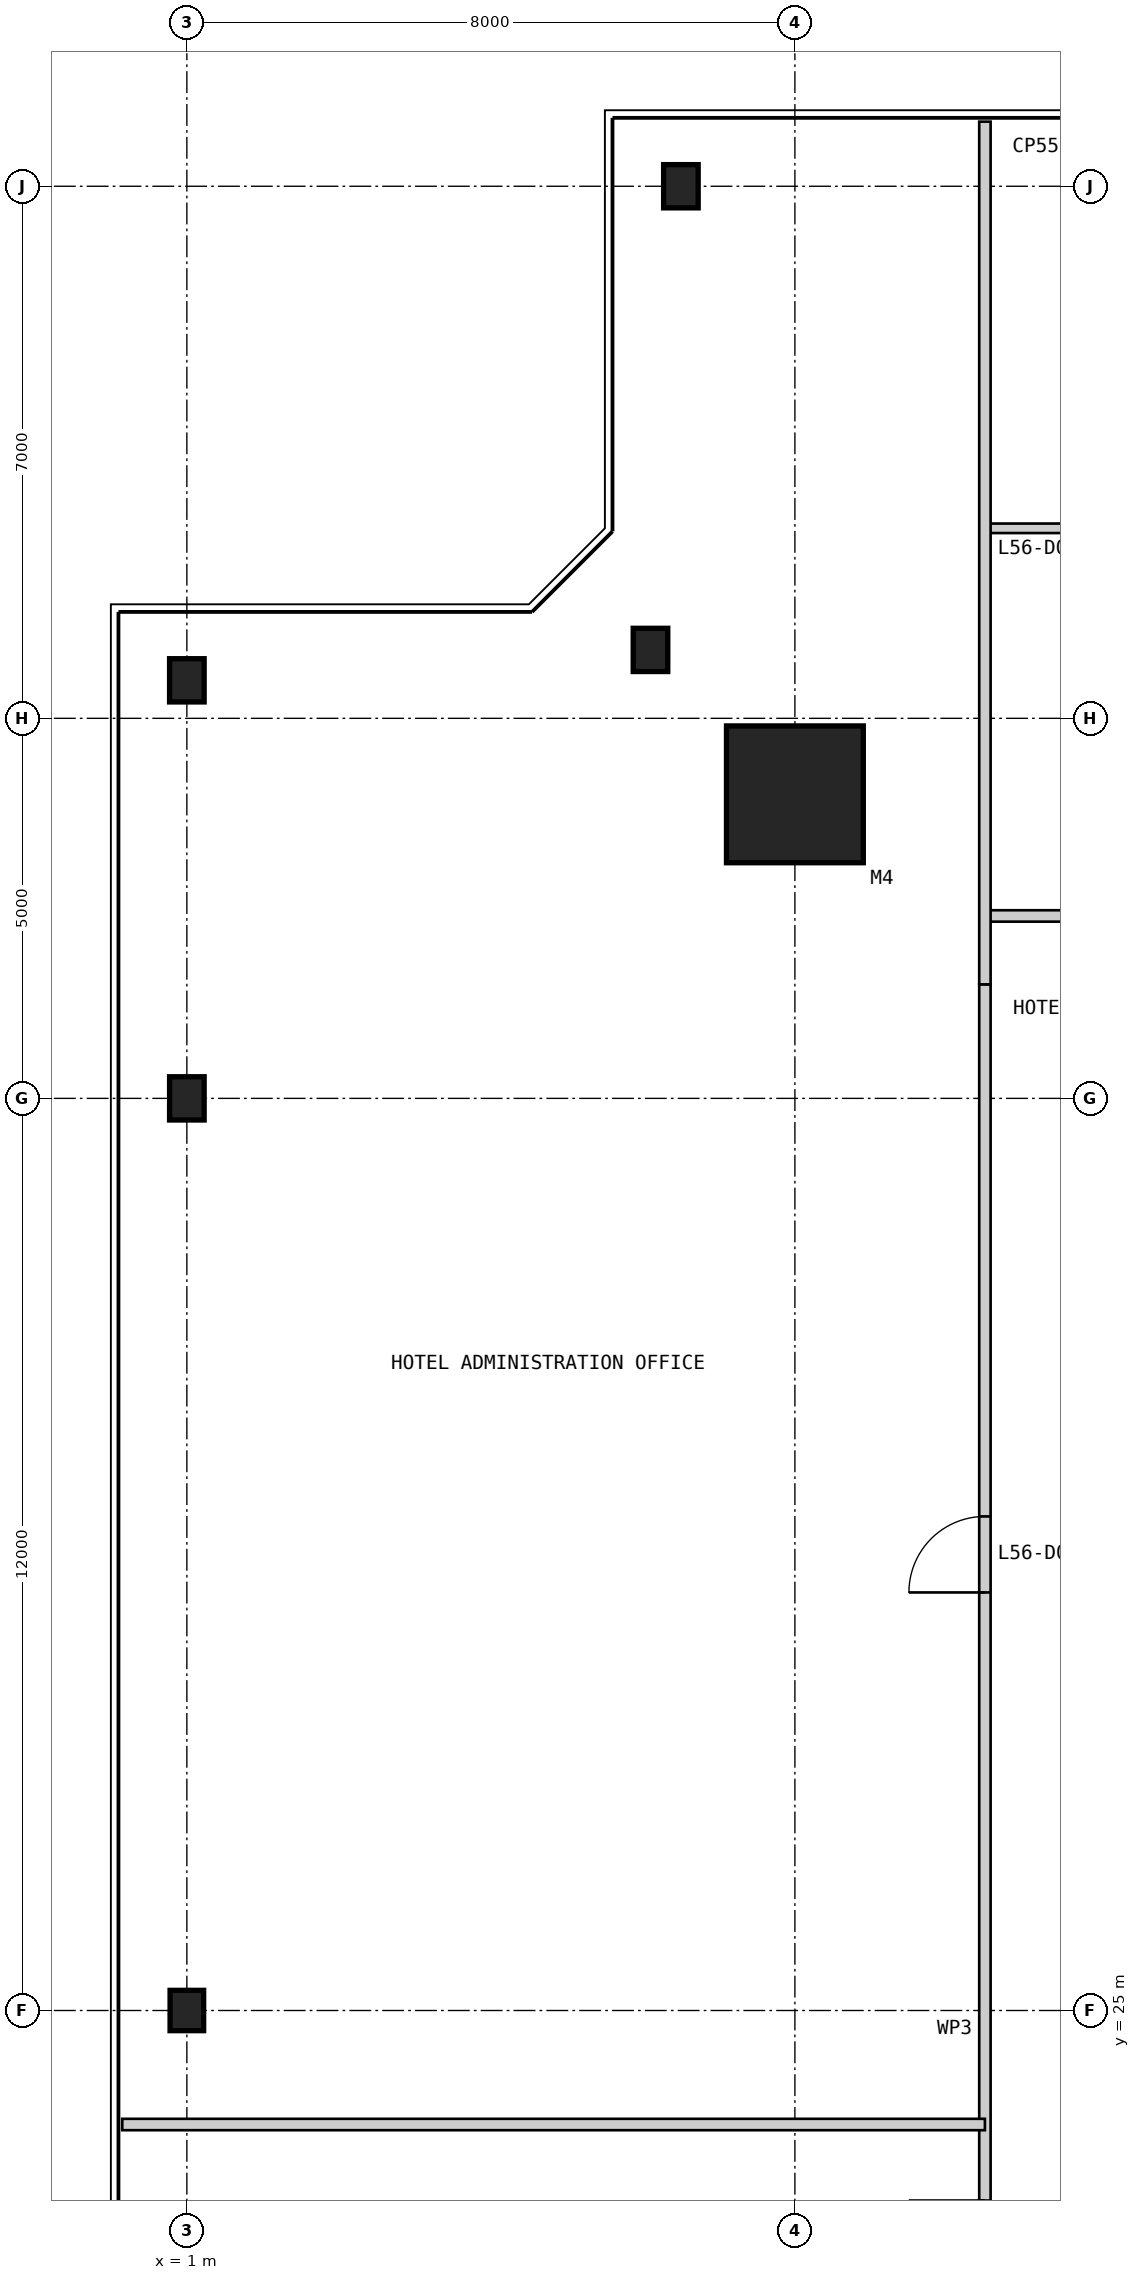
"""IFC4 building model, lengths in metres.
Left out: names, types, materials, properties, quantities, classifications, styles, units other than length and angle.
Written with IfcOpenShell. Run it as: python <this file> out.ifc"""

import sys

from ifc_helpers import new_model, si_unit, direction, frame, frame_2d, origin, origin_2d, place, context, subcontext, project, spatial, rectangle, i_section, extrude, element, fill, save


model = new_model("IFC4")
c1 = context("Model", 3, precision=1e-05, world=origin(), true_north=direction((0.0, 1.0)))
c2 = subcontext(c1, "Body", "Model", "MODEL_VIEW")
j1 = project(units=[si_unit("LENGTHUNIT", "METRE"), si_unit("PLANEANGLEUNIT", "RADIAN")], contexts=[c1])
p1 = place(None, origin())
s1 = spatial("IfcSite", under=j1, at=p1, CompositionType="ELEMENT")
p2 = place(p1, origin())
s2 = spatial("IfcBuilding", under=s1, at=p2, CompositionType="ELEMENT")
p3 = place(p2, frame((0.0, 0.0, 239.8)))
s3 = spatial("IfcBuildingStorey", under=s2, at=p3, CompositionType="ELEMENT", Elevation=239.8)
p4 = place(p3, frame((9.0, 41.0, 0.0), z_axis=(0.0, 0.0, 1.0), x_axis=(1.0, 0.0, 0.0)))
e1 = element("IfcColumn", 1, at=p4, inside=s3, PredefinedType="COLUMN", context=c2, shape_type="SweptSolid", body=[
    extrude(rectangle(XDim=1.8, YDim=1.8, at=origin_2d()), origin(), (0.0, 0.0, 1.0), 6.0),
])
for number, where, z_axis, x_axis in (
    (2, (7.5, 49.0, 0.0), (0.0, 0.0, 1.0), (1.0, 0.0, 0.0)),
    (3, (7.1, 42.9, 0.0), (0.0, 0.0, 1.0), (1.0, 0.0, 0.0)),
    (4, (1.0, 42.5, 0.0), (0.0, 0.0, 1.0), (1.0, 0.0, 0.0)),
    (5, (1.0, 37.0, 0.0), (0.0, 0.0, 1.0), (1.0, 0.0, 0.0)),
):
    element("IfcColumn", number, at=place(p3, frame(where, z_axis=z_axis, x_axis=x_axis)), inside=s3, PredefinedType="COLUMN", context=c2, shape_type="SweptSolid", body=[
        extrude(i_section(OverallWidth=0.455, OverallDepth=0.569, WebThickness=0.078, FlangeThickness=0.125, at=origin_2d()), origin(), (0.0, 0.0, 1.0), 6.0),
    ])
p5 = place(p3, frame((1.0, 25.0, 0.0), z_axis=(0.0, 0.0, 1.0), x_axis=(1.0, 0.0, 0.0)))
e6 = element("IfcColumn", 6, at=p5, inside=s3, PredefinedType="COLUMN", context=c2, shape_type="SweptSolid", body=[
    extrude(i_section(OverallWidth=0.442, OverallDepth=0.531, WebThickness=0.066, FlangeThickness=0.106, at=origin_2d()), origin(), (0.0, 0.0, 1.0), 6.0),
])
p6 = place(p3, frame((38.5, 39.4, 0.0), z_axis=(0.0, 0.0, 1.0), x_axis=(-1.0, 0.0, 0.0)))
e7 = element("IfcWall", 7, at=p6, inside=s3, PredefinedType="PARTITIONING", context=c2, shape_type="SweptSolid", body=[
    extrude(rectangle(XDim=27.0, YDim=0.15, at=frame_2d((13.5, 0.0))), origin(), (0.0, 0.0, 1.0), 5.85),
])
p7 = place(p6, frame((13.0, 0.0, 0.0)))
e8 = element("IfcOpeningElement", 8, at=p7, cuts=e7, PredefinedType="OPENING", context=c2, shape_type="SweptSolid", body=[
    extrude(rectangle(XDim=1.0, YDim=2.2, at=frame_2d((0.5, 1.1))), frame((0.0, 0.085, 0.0), z_axis=(0.0, -1.0, 0.0), x_axis=(1.0, 0.0, 0.0)), (0.0, 0.0, 1.0), 0.17),
])
p8 = place(p3, frame((35.5, 44.5, 0.0), z_axis=(0.0, 0.0, 1.0), x_axis=(-1.0, 0.0, 0.0)))
e9 = element("IfcWall", 9, at=p8, inside=s3, PredefinedType="PARTITIONING", context=c2, shape_type="SweptSolid", body=[
    extrude(rectangle(XDim=24.0, YDim=0.125, at=frame_2d((12.0, 0.0))), origin(), (0.0, 0.0, 1.0), 5.85),
])
p9 = place(p8, frame((16.05, 0.0, 0.0)))
e10 = element("IfcOpeningElement", 10, at=p9, cuts=e9, PredefinedType="OPENING", context=c2, shape_type="SweptSolid", body=[
    extrude(rectangle(XDim=0.9, YDim=2.2, at=frame_2d((0.45, 1.1))), frame((0.0, 0.073, 0.0), z_axis=(0.0, -1.0, 0.0), x_axis=(1.0, 0.0, 0.0)), (0.0, 0.0, 1.0), 0.145),
])
p10 = place(p8, frame((22.05, 0.0, 0.0)))
e11 = element("IfcOpeningElement", 11, at=p10, cuts=e9, PredefinedType="OPENING", context=c2, shape_type="SweptSolid", body=[
    extrude(rectangle(XDim=0.9, YDim=2.2, at=frame_2d((0.45, 1.1))), frame((0.0, 0.073, 0.0), z_axis=(0.0, -1.0, 0.0), x_axis=(1.0, 0.0, 0.0)), (0.0, 0.0, 1.0), 0.145),
])
p11 = place(p3, frame((11.5, 38.5, 0.0), z_axis=(0.0, 0.0, 1.0), x_axis=(0.0, -1.0, 0.0)))
e12 = element("IfcWall", 12, at=p11, inside=s3, PredefinedType="PARTITIONING", context=c2, shape_type="SweptSolid", body=[
    extrude(rectangle(XDim=27.0, YDim=0.15, at=frame_2d((13.5, 0.0))), origin(), (0.0, 0.0, 1.0), 5.85),
])
p12 = place(p11, frame((7.0, 0.0, 0.0)))
e13 = element("IfcOpeningElement", 13, at=p12, cuts=e12, PredefinedType="OPENING", context=c2, shape_type="SweptSolid", body=[
    extrude(rectangle(XDim=1.0, YDim=2.2, at=frame_2d((0.5, 1.1))), frame((0.0, 0.085, 0.0), z_axis=(0.0, -1.0, 0.0), x_axis=(1.0, 0.0, 0.0)), (0.0, 0.0, 1.0), 0.17),
])
p13 = place(p11, frame((16.0, 0.0, 0.0)))
e14 = element("IfcOpeningElement", 14, at=p13, cuts=e12, PredefinedType="OPENING", context=c2, shape_type="SweptSolid", body=[
    extrude(rectangle(XDim=1.0, YDim=2.2, at=frame_2d((0.5, 1.1))), frame((0.0, 0.085, 0.0), z_axis=(0.0, -1.0, 0.0), x_axis=(1.0, 0.0, 0.0)), (0.0, 0.0, 1.0), 0.17),
])
p14 = place(p11, frame((19.0, 0.0, 0.0)))
e15 = element("IfcOpeningElement", 15, at=p14, cuts=e12, PredefinedType="OPENING", context=c2, shape_type="SweptSolid", body=[
    extrude(rectangle(XDim=1.0, YDim=2.2, at=frame_2d((0.5, 1.1))), frame((0.0, 0.085, 0.0), z_axis=(0.0, -1.0, 0.0), x_axis=(1.0, 0.0, 0.0)), (0.0, 0.0, 1.0), 0.17),
])
p15 = place(p11, frame((22.0, 0.0, 0.0)))
e16 = element("IfcOpeningElement", 16, at=p15, cuts=e12, PredefinedType="OPENING", context=c2, shape_type="SweptSolid", body=[
    extrude(rectangle(XDim=1.0, YDim=2.2, at=frame_2d((0.5, 1.1))), frame((0.0, 0.085, 0.0), z_axis=(0.0, -1.0, 0.0), x_axis=(1.0, 0.0, 0.0)), (0.0, 0.0, 1.0), 0.17),
])
p16 = place(p11, frame((25.0, 0.0, 0.0)))
e17 = element("IfcOpeningElement", 17, at=p16, cuts=e12, PredefinedType="OPENING", context=c2, shape_type="SweptSolid", body=[
    extrude(rectangle(XDim=1.0, YDim=2.2, at=frame_2d((0.5, 1.1))), frame((0.0, 0.085, 0.0), z_axis=(0.0, -1.0, 0.0), x_axis=(1.0, 0.0, 0.0)), (0.0, 0.0, 1.0), 0.17),
])
for number, where, z_axis, x_axis in (
    (18, (11.5, 49.85, 0.0), (0.0, 0.0, 1.0), (0.0, -1.0, 0.0)),
    (19, (0.15, 23.5, 0.0), (0.0, 0.0, 1.0), (1.0, 0.0, 0.0)),
):
    element("IfcWall", number, at=place(p3, frame(where, z_axis=z_axis, x_axis=x_axis)), inside=s3, PredefinedType="PARTITIONING", context=c2, shape_type="SweptSolid", body=[
        extrude(rectangle(XDim=11.35, YDim=0.15, at=frame_2d((5.675, 0.0))), origin(), (0.0, 0.0, 1.0), 5.85),
    ])
p17 = place(p12, frame((1.0, 0.0, 0.0), z_axis=(0.0, 0.0, 1.0), x_axis=(-1.0, 0.0, 0.0)))
e20 = element("IfcDoor", 20, at=p17, inside=s3, OperationType="SINGLE_SWING_LEFT", PredefinedType="DOOR", context=c2, shape_type="SweptSolid", body=[
    extrude(rectangle(XDim=1.0, YDim=2.2, at=frame_2d((0.5, 1.1))), frame((0.0, 0.025, 0.0), z_axis=(0.0, -1.0, 0.0), x_axis=(1.0, 0.0, 0.0)), (0.0, 0.0, 1.0), 0.05),
])
fill(e13, e20)
save(model, sys.argv[1])
